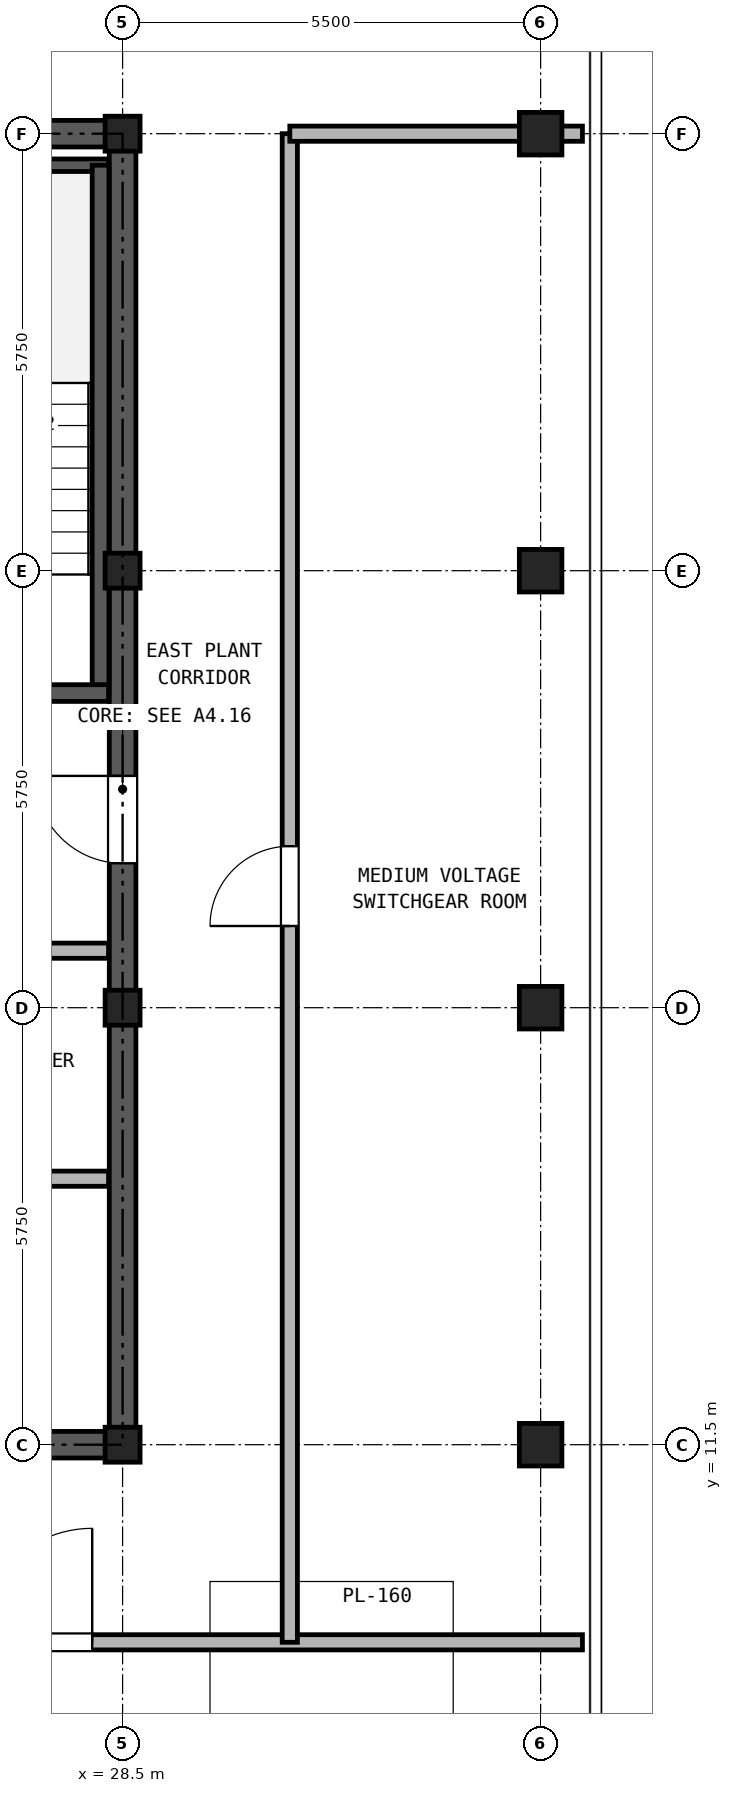
"""IFC4 building model, lengths in metres.
Left out: names, types, materials, properties, quantities, classifications, styles, units other than length and angle.
Written with IfcOpenShell. Run it as: python <this file> out.ifc"""

import sys

from ifc_helpers import new_model, si_unit, direction, frame, frame_2d, origin, origin_2d, place, context, subcontext, project, spatial, rectangle, hollow_rectangle, extrude, source, transform, mapped, element, fill, save


model = new_model("IFC4")
c1 = context("Model", 3, precision=1e-05, world=origin(), true_north=direction((0.0, 1.0)))
c2 = subcontext(c1, "Body", "Model", "MODEL_VIEW")
j1 = project(units=[si_unit("LENGTHUNIT", "METRE"), si_unit("PLANEANGLEUNIT", "RADIAN")], contexts=[c1])
p1 = place(None, origin())
s1 = spatial("IfcSite", under=j1, at=p1, CompositionType="ELEMENT")
p2 = place(p1, origin())
s2 = spatial("IfcBuilding", under=s1, at=p2, CompositionType="ELEMENT")
p3 = place(p2, frame((0.0, 0.0, 289.3)))
s3 = spatial("IfcBuildingStorey", under=s2, at=p3, CompositionType="ELEMENT", Elevation=289.3)
m1 = source(origin(), c2, "Body", "SweptSolid", [
    extrude(hollow_rectangle(XDim=0.56, YDim=0.56, WallThickness=0.03, at=origin_2d()), origin(), (0.0, 0.0, 1.0), 3.38),
])
for number, where, z_axis, x_axis in (
    (1, (34.0, 11.5, 0.0), (0.0, 0.0, 1.0), (1.0, 0.0, 0.0)),
    (2, (34.0, 17.25, 0.0), (0.0, 0.0, 1.0), (1.0, 0.0, 0.0)),
    (3, (34.0, 23.0, 0.0), (0.0, 0.0, 1.0), (1.0, 0.0, 0.0)),
    (4, (34.0, 28.75, 0.0), (0.0, 0.0, 1.0), (1.0, 0.0, 0.0)),
):
    element("IfcColumn", number, at=place(p3, frame(where, z_axis=z_axis, x_axis=x_axis)), inside=s3, PredefinedType="COLUMN", context=c2, shape_type="MappedRepresentation", body=[
        mapped(m1, transform((0.0, 0.0, 0.0), x_axis=(1.0, 0.0, 0.0), y_axis=(0.0, 1.0, 0.0), z_axis=(0.0, 0.0, 1.0), scale=1.0)),
    ])
m2 = source(origin(), c2, "Body", "SweptSolid", [
    extrude(hollow_rectangle(XDim=0.46, YDim=0.46, WallThickness=0.025, at=origin_2d()), origin(), (0.0, 0.0, 1.0), 3.38),
])
for number, where, z_axis, x_axis in (
    (5, (28.5, 11.5, 0.0), (0.0, 0.0, 1.0), (1.0, 0.0, 0.0)),
    (6, (28.5, 17.25, 0.0), (0.0, 0.0, 1.0), (1.0, 0.0, 0.0)),
    (7, (28.5, 23.0, 0.0), (0.0, 0.0, 1.0), (1.0, 0.0, 0.0)),
    (8, (28.5, 28.75, 0.0), (0.0, 0.0, 1.0), (1.0, 0.0, 0.0)),
):
    element("IfcColumn", number, at=place(p3, frame(where, z_axis=z_axis, x_axis=x_axis)), inside=s3, PredefinedType="COLUMN", context=c2, shape_type="MappedRepresentation", body=[
        mapped(m2, transform((0.0, 0.0, 0.0), x_axis=(1.0, 0.0, 0.0), y_axis=(0.0, 1.0, 0.0), z_axis=(0.0, 0.0, 1.0), scale=1.0)),
    ])
p4 = place(p3, frame((18.325, 11.5, 0.0), z_axis=(0.0, 0.0, 1.0), x_axis=(1.0, 0.0, 0.0)))
e9 = element("IfcWall", 9, at=p4, inside=s3, PredefinedType="SHEAR", context=c2, shape_type="SweptSolid", body=[
    extrude(rectangle(XDim=10.35, YDim=0.35, at=frame_2d((5.175, 0.0))), origin(), (0.0, 0.0, 1.0), 3.38),
])
p5 = place(p4, frame((4.375, 0.0, 0.0)))
e10 = element("IfcOpeningElement", 10, at=p5, cuts=e9, PredefinedType="OPENING", context=c2, shape_type="SweptSolid", body=[
    extrude(rectangle(XDim=1.5, YDim=2.25, at=frame_2d((0.75, 1.125))), frame((0.0, 0.185, 0.0), z_axis=(0.0, -1.0, 0.0), x_axis=(1.0, 0.0, 0.0)), (0.0, 0.0, 1.0), 0.37),
])
p6 = place(p3, frame((18.325, 28.75, 0.0), z_axis=(0.0, 0.0, 1.0), x_axis=(1.0, 0.0, 0.0)))
e11 = element("IfcWall", 11, at=p6, inside=s3, PredefinedType="SHEAR", context=c2, shape_type="SweptSolid", body=[
    extrude(rectangle(XDim=10.35, YDim=0.35, at=frame_2d((5.175, 0.0))), origin(), (0.0, 0.0, 1.0), 3.38),
])
p7 = place(p6, frame((4.055, 0.0, 0.0)))
e12 = element("IfcOpeningElement", 12, at=p7, cuts=e11, PredefinedType="OPENING", context=c2, shape_type="SweptSolid", body=[
    extrude(rectangle(XDim=0.9, YDim=2.05, at=frame_2d((0.45, 1.025))), frame((0.0, 0.185, 0.0), z_axis=(0.0, -1.0, 0.0), x_axis=(1.0, 0.0, 0.0)), (0.0, 0.0, 1.0), 0.37),
])
p8 = place(p6, frame((5.595, 0.0, 0.0)))
e13 = element("IfcOpeningElement", 13, at=p8, cuts=e11, PredefinedType="OPENING", context=c2, shape_type="SweptSolid", body=[
    extrude(rectangle(XDim=0.9, YDim=2.05, at=frame_2d((0.45, 1.025))), frame((0.0, 0.185, 0.0), z_axis=(0.0, -1.0, 0.0), x_axis=(1.0, 0.0, 0.0)), (0.0, 0.0, 1.0), 0.37),
])
p9 = place(p3, frame((28.5, 11.675, 0.0), z_axis=(0.0, 0.0, 1.0), x_axis=(0.0, 1.0, 0.0)))
e14 = element("IfcWall", 14, at=p9, inside=s3, PredefinedType="SHEAR", context=c2, shape_type="SweptSolid", body=[
    extrude(rectangle(XDim=16.9, YDim=0.35, at=frame_2d((8.45, 0.0))), origin(), (0.0, 0.0, 1.0), 3.38),
])
p10 = place(p9, frame((7.475, 0.0, 0.0)))
e15 = element("IfcOpeningElement", 15, at=p10, cuts=e14, PredefinedType="OPENING", context=c2, shape_type="SweptSolid", body=[
    extrude(rectangle(XDim=1.15, YDim=2.2, at=frame_2d((0.575, 1.1))), frame((0.0, 0.185, 0.0), z_axis=(0.0, -1.0, 0.0), x_axis=(1.0, 0.0, 0.0)), (0.0, 0.0, 1.0), 0.37),
])
p11 = place(p3, frame((25.13, 28.335, 0.0), z_axis=(0.0, 0.0, 1.0), x_axis=(1.0, 0.0, 0.0)))
e16 = element("IfcWall", 16, at=p11, inside=s3, PredefinedType="PARTITIONING", context=c2, shape_type="SweptSolid", body=[
    extrude(rectangle(XDim=3.185, YDim=0.165, at=frame_2d((1.593, 0.0))), origin(), (0.0, 0.0, 1.0), 3.38),
])
p12 = place(p3, frame((28.21, 21.39, 0.0), z_axis=(0.0, 0.0, 1.0), x_axis=(0.0, 1.0, 0.0)))
e17 = element("IfcWall", 17, at=p12, inside=s3, PredefinedType="SOLIDWALL", context=c2, shape_type="SweptSolid", body=[
    extrude(rectangle(XDim=6.945, YDim=0.22, at=frame_2d((3.473, 0.0))), origin(), (0.0, 0.0, 1.0), 3.38),
])
p13 = place(p3, frame((25.13, 21.39, 0.0), z_axis=(0.0, 0.0, 1.0), x_axis=(1.0, 0.0, 0.0)))
e18 = element("IfcWall", 18, at=p13, inside=s3, PredefinedType="SOLIDWALL", context=c2, shape_type="SweptSolid", body=[
    extrude(rectangle(XDim=3.185, YDim=0.22, at=frame_2d((1.593, 0.0))), origin(), (0.0, 0.0, 1.0), 3.38),
])
p14 = place(p13, frame((0.92, 0.0, 0.0)))
e19 = element("IfcOpeningElement", 19, at=p14, cuts=e18, PredefinedType="OPENING", context=c2, shape_type="SweptSolid", body=[
    extrude(rectangle(XDim=1.15, YDim=2.2, at=frame_2d((0.575, 1.1))), frame((0.0, 0.12, 0.0), z_axis=(0.0, -1.0, 0.0), x_axis=(1.0, 0.0, 0.0)), (0.0, 0.0, 1.0), 0.24),
])
p15 = place(p3, frame((18.685, 18.0, 0.0), z_axis=(0.0, 0.0, 1.0), x_axis=(1.0, 0.0, 0.0)))
e20 = element("IfcWall", 20, at=p15, inside=s3, PredefinedType="PARTITIONING", context=c2, shape_type="SweptSolid", body=[
    extrude(rectangle(XDim=9.63, YDim=0.2, at=frame_2d((4.815, 0.0))), origin(), (0.0, 0.0, 1.0), 3.38),
])
p16 = place(p15, frame((0.565, 0.0, 0.0)))
e21 = element("IfcOpeningElement", 21, at=p16, cuts=e20, PredefinedType="OPENING", context=c2, shape_type="SweptSolid", body=[
    extrude(rectangle(XDim=1.3, YDim=2.3, at=frame_2d((0.65, 1.15))), frame((0.0, 0.11, 0.0), z_axis=(0.0, -1.0, 0.0), x_axis=(1.0, 0.0, 0.0)), (0.0, 0.0, 1.0), 0.22),
])
p17 = place(p15, frame((2.665, 0.0, 0.0)))
e22 = element("IfcOpeningElement", 22, at=p17, cuts=e20, PredefinedType="OPENING", context=c2, shape_type="SweptSolid", body=[
    extrude(rectangle(XDim=1.3, YDim=2.3, at=frame_2d((0.65, 1.15))), frame((0.0, 0.11, 0.0), z_axis=(0.0, -1.0, 0.0), x_axis=(1.0, 0.0, 0.0)), (0.0, 0.0, 1.0), 0.22),
])
p18 = place(p15, frame((5.065, 0.0, 0.0)))
e23 = element("IfcOpeningElement", 23, at=p18, cuts=e20, PredefinedType="OPENING", context=c2, shape_type="SweptSolid", body=[
    extrude(rectangle(XDim=0.9, YDim=2.05, at=frame_2d((0.45, 1.025))), frame((0.0, 0.11, 0.0), z_axis=(0.0, -1.0, 0.0), x_axis=(1.0, 0.0, 0.0)), (0.0, 0.0, 1.0), 0.22),
])
p19 = place(p15, frame((7.765, 0.0, 0.0)))
e24 = element("IfcOpeningElement", 24, at=p19, cuts=e20, PredefinedType="OPENING", context=c2, shape_type="SweptSolid", body=[
    extrude(rectangle(XDim=0.9, YDim=2.05, at=frame_2d((0.45, 1.025))), frame((0.0, 0.11, 0.0), z_axis=(0.0, -1.0, 0.0), x_axis=(1.0, 0.0, 0.0)), (0.0, 0.0, 1.0), 0.22),
])
p20 = place(p3, frame((18.685, 15.0, 0.0), z_axis=(0.0, 0.0, 1.0), x_axis=(1.0, 0.0, 0.0)))
e25 = element("IfcWall", 25, at=p20, inside=s3, PredefinedType="PARTITIONING", context=c2, shape_type="SweptSolid", body=[
    extrude(rectangle(XDim=9.63, YDim=0.2, at=frame_2d((4.815, 0.0))), origin(), (0.0, 0.0, 1.0), 3.38),
])
p21 = place(p3, frame((12.45, 8.9, 0.0), z_axis=(0.0, 0.0, 1.0), x_axis=(1.0, 0.0, 0.0)))
e26 = element("IfcWall", 26, at=p21, inside=s3, PredefinedType="PARTITIONING", context=c2, shape_type="SweptSolid", body=[
    extrude(rectangle(XDim=22.1, YDim=0.2, at=frame_2d((11.05, 0.0))), origin(), (0.0, 0.0, 1.0), 3.38),
])
p22 = place(p21, frame((6.95, 0.0, 0.0)))
e27 = element("IfcOpeningElement", 27, at=p22, cuts=e26, PredefinedType="OPENING", context=c2, shape_type="SweptSolid", body=[
    extrude(rectangle(XDim=1.5, YDim=2.25, at=frame_2d((0.75, 1.125))), frame((0.0, 0.11, 0.0), z_axis=(0.0, -1.0, 0.0), x_axis=(1.0, 0.0, 0.0)), (0.0, 0.0, 1.0), 0.22),
])
p23 = place(p21, frame((14.15, 0.0, 0.0)))
e28 = element("IfcOpeningElement", 28, at=p23, cuts=e26, PredefinedType="OPENING", context=c2, shape_type="SweptSolid", body=[
    extrude(rectangle(XDim=1.5, YDim=2.25, at=frame_2d((0.75, 1.125))), frame((0.0, 0.11, 0.0), z_axis=(0.0, -1.0, 0.0), x_axis=(1.0, 0.0, 0.0)), (0.0, 0.0, 1.0), 0.22),
])
p24 = place(p3, frame((30.7, 8.9, 0.0), z_axis=(0.0, 0.0, 1.0), x_axis=(0.0, 1.0, 0.0)))
e29 = element("IfcWall", 29, at=p24, inside=s3, PredefinedType="PARTITIONING", context=c2, shape_type="SweptSolid", body=[
    extrude(rectangle(XDim=19.85, YDim=0.2, at=frame_2d((9.925, 0.0))), origin(), (0.0, 0.0, 1.0), 3.38),
])
p25 = place(p24, frame((9.425, 0.0, 0.0)))
e30 = element("IfcOpeningElement", 30, at=p25, cuts=e29, PredefinedType="OPENING", context=c2, shape_type="SweptSolid", body=[
    extrude(rectangle(XDim=1.05, YDim=2.15, at=frame_2d((0.525, 1.075))), frame((0.0, 0.11, 0.0), z_axis=(0.0, -1.0, 0.0), x_axis=(1.0, 0.0, 0.0)), (0.0, 0.0, 1.0), 0.22),
])
p26 = place(p3, frame((30.7, 28.75, 0.0), z_axis=(0.0, 0.0, 1.0), x_axis=(1.0, 0.0, 0.0)))
e31 = element("IfcWall", 31, at=p26, inside=s3, PredefinedType="PARTITIONING", context=c2, shape_type="SweptSolid", body=[
    extrude(rectangle(XDim=3.85, YDim=0.2, at=frame_2d((1.925, 0.0))), origin(), (0.0, 0.0, 1.0), 2.905),
])
p27 = place(p10, origin())
e32 = element("IfcDoor", 32, at=p27, inside=s3, OperationType="SINGLE_SWING_RIGHT", PredefinedType="DOOR", context=c2, shape_type="SweptSolid", body=[
    extrude(rectangle(XDim=1.15, YDim=2.2, at=frame_2d((0.575, 1.1))), frame((0.0, 0.025, 0.0), z_axis=(0.0, -1.0, 0.0), x_axis=(1.0, 0.0, 0.0)), (0.0, 0.0, 1.0), 0.05),
])
fill(e15, e32)
p28 = place(p23, frame((1.5, 0.0, 0.0), z_axis=(0.0, 0.0, 1.0), x_axis=(-1.0, 0.0, 0.0)))
e33 = element("IfcDoor", 33, at=p28, inside=s3, OperationType="SINGLE_SWING_RIGHT", PredefinedType="DOOR", context=c2, shape_type="SweptSolid", body=[
    extrude(rectangle(XDim=1.5, YDim=2.25, at=frame_2d((0.75, 1.125))), frame((0.0, 0.025, 0.0), z_axis=(0.0, -1.0, 0.0), x_axis=(1.0, 0.0, 0.0)), (0.0, 0.0, 1.0), 0.05),
])
fill(e28, e33)
p29 = place(p25, origin())
e34 = element("IfcDoor", 34, at=p29, inside=s3, OperationType="SINGLE_SWING_LEFT", PredefinedType="DOOR", context=c2, shape_type="SweptSolid", body=[
    extrude(rectangle(XDim=1.05, YDim=2.15, at=frame_2d((0.525, 1.075))), frame((0.0, 0.025, 0.0), z_axis=(0.0, -1.0, 0.0), x_axis=(1.0, 0.0, 0.0)), (0.0, 0.0, 1.0), 0.05),
])
fill(e30, e34)
save(model, sys.argv[1])
